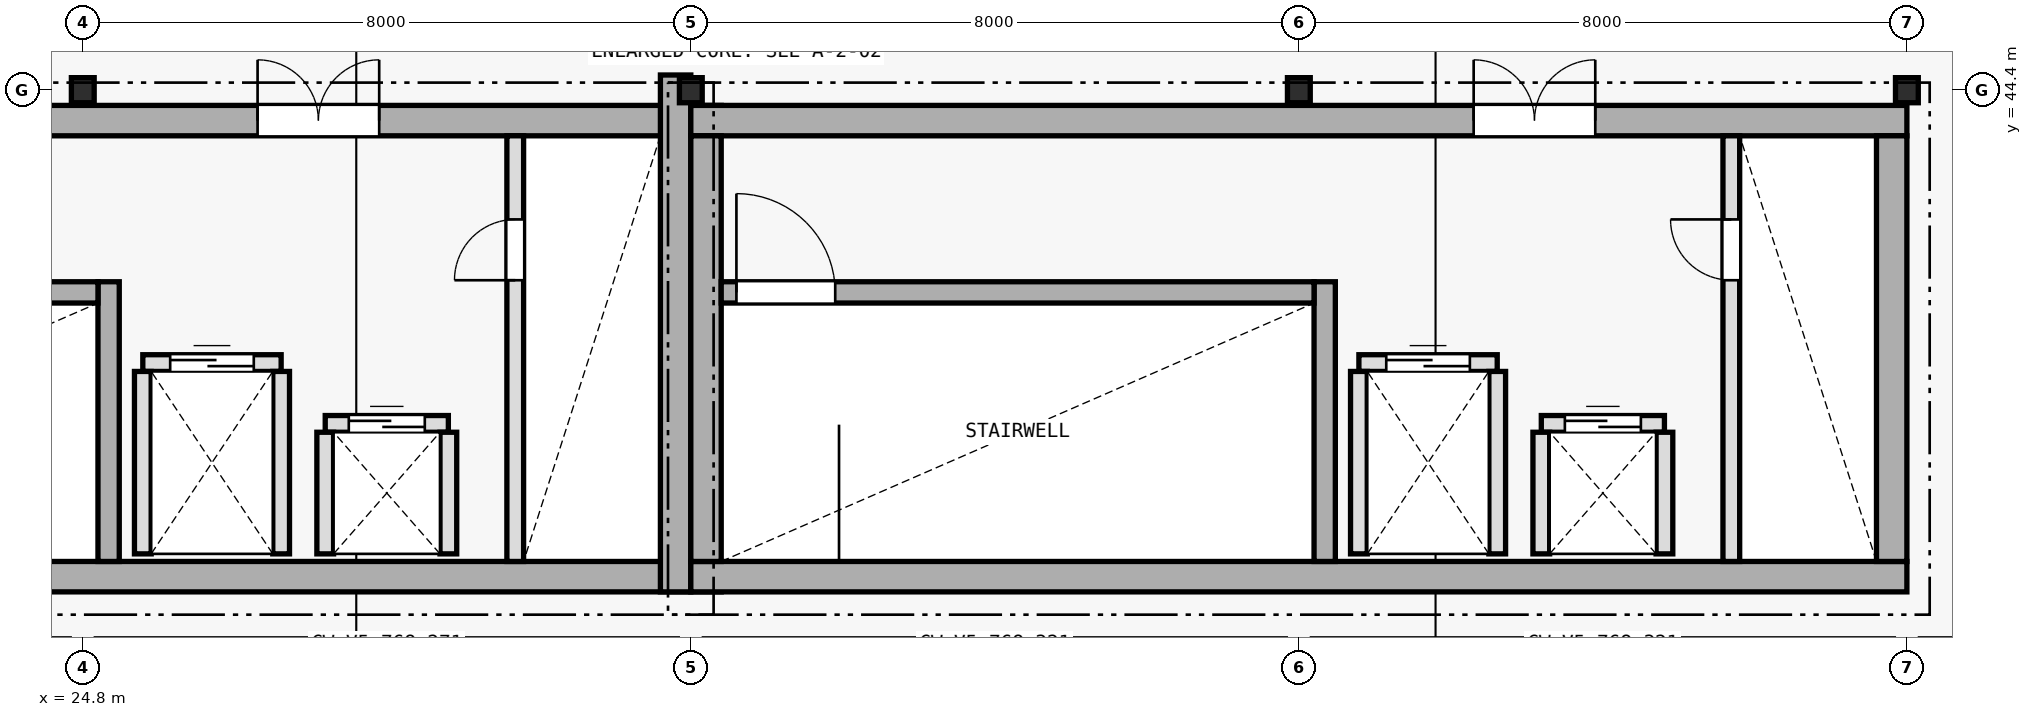
"""IFC4 building model, lengths in metres.
Left out: names, types, materials, properties, quantities, classifications, styles, units other than length and angle.
Written with IfcOpenShell. Run it as: python <this file> out.ifc"""

import sys

from ifc_helpers import new_model, si_unit, direction, frame, frame_2d, origin, origin_2d, place, context, subcontext, project, spatial, rectangle, i_section, extrude, element, fill, save


model = new_model("IFC4")
c1 = context("Model", 3, precision=1e-05, world=origin(), true_north=direction((0.0, 1.0)))
c2 = subcontext(c1, "Body", "Model", "MODEL_VIEW")
j1 = project(units=[si_unit("LENGTHUNIT", "METRE"), si_unit("PLANEANGLEUNIT", "RADIAN")], contexts=[c1])
p1 = place(None, origin())
s1 = spatial("IfcSite", under=j1, at=p1, CompositionType="ELEMENT")
p2 = place(p1, origin())
s2 = spatial("IfcBuilding", under=s1, at=p2, CompositionType="ELEMENT")
p3 = place(p2, frame((0.0, 0.0, 31.1)))
s3 = spatial("IfcBuildingStorey", under=s2, at=p3, CompositionType="ELEMENT", Elevation=31.1)
p4 = place(p3, frame((16.8, 38.0, 0.0), z_axis=(0.0, 0.0, 1.0), x_axis=(1.0, 0.0, 0.0)))
e1 = element("IfcWall", 1, at=p4, inside=s3, PredefinedType="SHEAR", context=c2, shape_type="SweptSolid", body=[
    extrude(rectangle(XDim=16.4, YDim=0.4, at=frame_2d((8.2, 0.0))), origin(), (0.0, 0.0, 1.0), 3.895),
])
p5 = place(p3, frame((16.8, 44.0, 0.0), z_axis=(0.0, 0.0, 1.0), x_axis=(1.0, 0.0, 0.0)))
e2 = element("IfcWall", 2, at=p5, inside=s3, PredefinedType="SHEAR", context=c2, shape_type="SweptSolid", body=[
    extrude(rectangle(XDim=16.4, YDim=0.4, at=frame_2d((8.2, 0.0))), origin(), (0.0, 0.0, 1.0), 3.895),
])
p6 = place(p5, frame((10.3, 0.0, 0.0)))
e3 = element("IfcOpeningElement", 3, at=p6, cuts=e2, PredefinedType="OPENING", context=c2, shape_type="SweptSolid", body=[
    extrude(rectangle(XDim=1.6, YDim=2.2, at=frame_2d((0.8, 1.1))), frame((0.0, 0.21, 0.0), z_axis=(0.0, -1.0, 0.0), x_axis=(1.0, 0.0, 0.0)), (0.0, 0.0, 1.0), 0.42),
])
p7 = place(p3, frame((32.6, 37.8, 0.0), z_axis=(0.0, 0.0, 1.0), x_axis=(0.0, 1.0, 0.0)))
e4 = element("IfcWall", 4, at=p7, inside=s3, PredefinedType="SHEAR", context=c2, shape_type="SweptSolid", body=[
    extrude(rectangle(XDim=6.8, YDim=0.4, at=frame_2d((3.4, 0.0))), origin(), (0.0, 0.0, 1.0), 3.895),
])
p8 = place(p3, frame((25.14, 38.2, 0.0), z_axis=(0.0, 0.0, 1.0), x_axis=(0.0, 1.0, 0.0)))
e5 = element("IfcWall", 5, at=p8, inside=s3, PredefinedType="SHEAR", context=c2, shape_type="SweptSolid", body=[
    extrude(rectangle(XDim=3.68, YDim=0.28, at=frame_2d((1.84, 0.0))), origin(), (0.0, 0.0, 1.0), 3.895),
])
p9 = place(p3, frame((17.2, 41.74, 0.0), z_axis=(0.0, 0.0, 1.0), x_axis=(1.0, 0.0, 0.0)))
e6 = element("IfcWall", 6, at=p9, inside=s3, PredefinedType="SHEAR", context=c2, shape_type="SweptSolid", body=[
    extrude(rectangle(XDim=7.8, YDim=0.28, at=frame_2d((3.9, 0.0))), origin(), (0.0, 0.0, 1.0), 3.895),
])
p10 = place(p9, frame((0.2, 0.0, 0.0)))
e7 = element("IfcOpeningElement", 7, at=p10, cuts=e6, PredefinedType="OPENING", context=c2, shape_type="SweptSolid", body=[
    extrude(rectangle(XDim=1.3, YDim=2.2, at=frame_2d((0.65, 1.1))), frame((0.0, 0.15, 0.0), z_axis=(0.0, -1.0, 0.0), x_axis=(1.0, 0.0, 0.0)), (0.0, 0.0, 1.0), 0.3),
])
p11 = place(p3, frame((32.8, 38.0, 0.0), z_axis=(0.0, 0.0, 1.0), x_axis=(1.0, 0.0, 0.0)))
e8 = element("IfcWall", 8, at=p11, inside=s3, PredefinedType="SHEAR", context=c2, shape_type="SweptSolid", body=[
    extrude(rectangle(XDim=16.0, YDim=0.4, at=frame_2d((8.0, 0.0))), origin(), (0.0, 0.0, 1.0), 3.895),
])
p12 = place(p3, frame((32.8, 44.0, 0.0), z_axis=(0.0, 0.0, 1.0), x_axis=(1.0, 0.0, 0.0)))
e9 = element("IfcWall", 9, at=p12, inside=s3, PredefinedType="SHEAR", context=c2, shape_type="SweptSolid", body=[
    extrude(rectangle(XDim=16.0, YDim=0.4, at=frame_2d((8.0, 0.0))), origin(), (0.0, 0.0, 1.0), 3.895),
])
p13 = place(p12, frame((10.3, 0.0, 0.0)))
e10 = element("IfcOpeningElement", 10, at=p13, cuts=e9, PredefinedType="OPENING", context=c2, shape_type="SweptSolid", body=[
    extrude(rectangle(XDim=1.6, YDim=2.2, at=frame_2d((0.8, 1.1))), frame((0.0, 0.21, 0.0), z_axis=(0.0, -1.0, 0.0), x_axis=(1.0, 0.0, 0.0)), (0.0, 0.0, 1.0), 0.42),
])
for number, where, z_axis, x_axis in (
    (11, (33.0, 38.2, 0.0), (0.0, 0.0, 1.0), (0.0, 1.0, 0.0)),
    (12, (48.6, 38.2, 0.0), (0.0, 0.0, 1.0), (0.0, 1.0, 0.0)),
):
    element("IfcWall", number, at=place(p3, frame(where, z_axis=z_axis, x_axis=x_axis)), inside=s3, PredefinedType="SHEAR", context=c2, shape_type="SweptSolid", body=[
        extrude(rectangle(XDim=5.6, YDim=0.4, at=frame_2d((2.8, 0.0))), origin(), (0.0, 0.0, 1.0), 3.895),
    ])
p14 = place(p3, frame((41.14, 38.2, 0.0), z_axis=(0.0, 0.0, 1.0), x_axis=(0.0, 1.0, 0.0)))
e13 = element("IfcWall", 13, at=p14, inside=s3, PredefinedType="SHEAR", context=c2, shape_type="SweptSolid", body=[
    extrude(rectangle(XDim=3.68, YDim=0.28, at=frame_2d((1.84, 0.0))), origin(), (0.0, 0.0, 1.0), 3.895),
])
p15 = place(p3, frame((33.2, 41.74, 0.0), z_axis=(0.0, 0.0, 1.0), x_axis=(1.0, 0.0, 0.0)))
e14 = element("IfcWall", 14, at=p15, inside=s3, PredefinedType="SHEAR", context=c2, shape_type="SweptSolid", body=[
    extrude(rectangle(XDim=7.8, YDim=0.28, at=frame_2d((3.9, 0.0))), origin(), (0.0, 0.0, 1.0), 3.895),
])
p16 = place(p15, frame((0.2, 0.0, 0.0)))
e15 = element("IfcOpeningElement", 15, at=p16, cuts=e14, PredefinedType="OPENING", context=c2, shape_type="SweptSolid", body=[
    extrude(rectangle(XDim=1.3, YDim=2.2, at=frame_2d((0.65, 1.1))), frame((0.0, 0.15, 0.0), z_axis=(0.0, -1.0, 0.0), x_axis=(1.0, 0.0, 0.0)), (0.0, 0.0, 1.0), 0.3),
])
for number, where, z_axis, x_axis in (
    (16, (24.8, 44.4, 0.0), (0.0, 0.0, 1.0), (1.0, 0.0, 0.0)),
    (17, (32.8, 44.4, 0.0), (0.0, 0.0, 1.0), (1.0, 0.0, 0.0)),
    (18, (40.8, 44.4, 0.0), (0.0, 0.0, 1.0), (1.0, 0.0, 0.0)),
    (19, (48.8, 44.4, 0.0), (0.0, 0.0, 1.0), (1.0, 0.0, 0.0)),
):
    element("IfcColumn", number, at=place(p3, frame(where, z_axis=z_axis, x_axis=x_axis)), inside=s3, PredefinedType="COLUMN", context=c2, shape_type="SweptSolid", body=[
        extrude(i_section(OverallWidth=0.3, OverallDepth=0.33, WebThickness=0.01, FlangeThickness=0.017, FilletRadius=0.027, at=origin_2d()), origin(), (0.0, 0.0, 1.0), 3.9),
    ])
p17 = place(p3, frame((25.59, 40.81, 0.0), z_axis=(0.0, 0.0, 1.0), x_axis=(1.0, 0.0, 0.0)))
e20 = element("IfcWall", 20, at=p17, inside=s3, PredefinedType="PLUMBINGWALL", context=c2, shape_type="SweptSolid", body=[
    extrude(rectangle(XDim=1.82, YDim=0.22, at=frame_2d((0.91, 0.0))), origin(), (0.0, 0.0, 1.0), 3.62),
])
p18 = place(p17, frame((0.36, 0.0, 0.0)))
e21 = element("IfcOpeningElement", 21, at=p18, cuts=e20, PredefinedType="OPENING", context=c2, shape_type="SweptSolid", body=[
    extrude(rectangle(XDim=1.1, YDim=2.2, at=frame_2d((0.55, 1.1))), frame((0.0, 0.12, 0.0), z_axis=(0.0, -1.0, 0.0), x_axis=(1.0, 0.0, 0.0)), (0.0, 0.0, 1.0), 0.24),
])
for number, where, z_axis, x_axis in (
    (22, (25.59, 38.3, 0.0), (0.0, 0.0, 1.0), (0.0, 1.0, 0.0)),
    (23, (27.41, 38.3, 0.0), (0.0, 0.0, 1.0), (0.0, 1.0, 0.0)),
):
    element("IfcWall", number, at=place(p3, frame(where, z_axis=z_axis, x_axis=x_axis)), inside=s3, PredefinedType="PLUMBINGWALL", context=c2, shape_type="SweptSolid", body=[
        extrude(rectangle(XDim=2.4, YDim=0.22, at=frame_2d((1.2, 0.0))), origin(), (0.0, 0.0, 1.0), 3.62),
    ])
p19 = place(p3, frame((27.99, 40.01, 0.0), z_axis=(0.0, 0.0, 1.0), x_axis=(1.0, 0.0, 0.0)))
e24 = element("IfcWall", 24, at=p19, inside=s3, PredefinedType="PLUMBINGWALL", context=c2, shape_type="SweptSolid", body=[
    extrude(rectangle(XDim=1.62, YDim=0.22, at=frame_2d((0.81, 0.0))), origin(), (0.0, 0.0, 1.0), 3.62),
])
p20 = place(p19, frame((0.31, 0.0, 0.0)))
e25 = element("IfcOpeningElement", 25, at=p20, cuts=e24, PredefinedType="OPENING", context=c2, shape_type="SweptSolid", body=[
    extrude(rectangle(XDim=1.0, YDim=2.2, at=frame_2d((0.5, 1.1))), frame((0.0, 0.12, 0.0), z_axis=(0.0, -1.0, 0.0), x_axis=(1.0, 0.0, 0.0)), (0.0, 0.0, 1.0), 0.24),
])
for number, where, z_axis, x_axis in (
    (26, (27.99, 38.3, 0.0), (0.0, 0.0, 1.0), (0.0, 1.0, 0.0)),
    (27, (29.61, 38.3, 0.0), (0.0, 0.0, 1.0), (0.0, 1.0, 0.0)),
):
    element("IfcWall", number, at=place(p3, frame(where, z_axis=z_axis, x_axis=x_axis)), inside=s3, PredefinedType="PLUMBINGWALL", context=c2, shape_type="SweptSolid", body=[
        extrude(rectangle(XDim=1.6, YDim=0.22, at=frame_2d((0.8, 0.0))), origin(), (0.0, 0.0, 1.0), 3.62),
    ])
p21 = place(p3, frame((30.49, 38.2, 0.0), z_axis=(0.0, 0.0, 1.0), x_axis=(0.0, 1.0, 0.0)))
e28 = element("IfcWall", 28, at=p21, inside=s3, PredefinedType="PLUMBINGWALL", context=c2, shape_type="SweptSolid", body=[
    extrude(rectangle(XDim=5.6, YDim=0.22, at=frame_2d((2.8, 0.0))), origin(), (0.0, 0.0, 1.0), 3.62),
])
p22 = place(p21, frame((3.7, 0.0, 0.0)))
e29 = element("IfcOpeningElement", 29, at=p22, cuts=e28, PredefinedType="OPENING", context=c2, shape_type="SweptSolid", body=[
    extrude(rectangle(XDim=0.8, YDim=2.1, at=frame_2d((0.4, 1.05))), frame((0.0, 0.12, 0.0), z_axis=(0.0, -1.0, 0.0), x_axis=(1.0, 0.0, 0.0)), (0.0, 0.0, 1.0), 0.24),
])
p23 = place(p3, frame((41.59, 40.81, 0.0), z_axis=(0.0, 0.0, 1.0), x_axis=(1.0, 0.0, 0.0)))
e30 = element("IfcWall", 30, at=p23, inside=s3, PredefinedType="PLUMBINGWALL", context=c2, shape_type="SweptSolid", body=[
    extrude(rectangle(XDim=1.82, YDim=0.22, at=frame_2d((0.91, 0.0))), origin(), (0.0, 0.0, 1.0), 3.62),
])
p24 = place(p23, frame((0.36, 0.0, 0.0)))
e31 = element("IfcOpeningElement", 31, at=p24, cuts=e30, PredefinedType="OPENING", context=c2, shape_type="SweptSolid", body=[
    extrude(rectangle(XDim=1.1, YDim=2.2, at=frame_2d((0.55, 1.1))), frame((0.0, 0.12, 0.0), z_axis=(0.0, -1.0, 0.0), x_axis=(1.0, 0.0, 0.0)), (0.0, 0.0, 1.0), 0.24),
])
for number, where, z_axis, x_axis in (
    (32, (41.59, 38.3, 0.0), (0.0, 0.0, 1.0), (0.0, 1.0, 0.0)),
    (33, (43.41, 38.3, 0.0), (0.0, 0.0, 1.0), (0.0, 1.0, 0.0)),
):
    element("IfcWall", number, at=place(p3, frame(where, z_axis=z_axis, x_axis=x_axis)), inside=s3, PredefinedType="PLUMBINGWALL", context=c2, shape_type="SweptSolid", body=[
        extrude(rectangle(XDim=2.4, YDim=0.22, at=frame_2d((1.2, 0.0))), origin(), (0.0, 0.0, 1.0), 3.62),
    ])
p25 = place(p3, frame((43.99, 40.01, 0.0), z_axis=(0.0, 0.0, 1.0), x_axis=(1.0, 0.0, 0.0)))
e34 = element("IfcWall", 34, at=p25, inside=s3, PredefinedType="PLUMBINGWALL", context=c2, shape_type="SweptSolid", body=[
    extrude(rectangle(XDim=1.62, YDim=0.22, at=frame_2d((0.81, 0.0))), origin(), (0.0, 0.0, 1.0), 3.62),
])
p26 = place(p25, frame((0.31, 0.0, 0.0)))
e35 = element("IfcOpeningElement", 35, at=p26, cuts=e34, PredefinedType="OPENING", context=c2, shape_type="SweptSolid", body=[
    extrude(rectangle(XDim=1.0, YDim=2.2, at=frame_2d((0.5, 1.1))), frame((0.0, 0.12, 0.0), z_axis=(0.0, -1.0, 0.0), x_axis=(1.0, 0.0, 0.0)), (0.0, 0.0, 1.0), 0.24),
])
for number, where, z_axis, x_axis in (
    (36, (43.99, 38.3, 0.0), (0.0, 0.0, 1.0), (0.0, 1.0, 0.0)),
    (37, (45.61, 38.3, 0.0), (0.0, 0.0, 1.0), (0.0, 1.0, 0.0)),
):
    element("IfcWall", number, at=place(p3, frame(where, z_axis=z_axis, x_axis=x_axis)), inside=s3, PredefinedType="PLUMBINGWALL", context=c2, shape_type="SweptSolid", body=[
        extrude(rectangle(XDim=1.6, YDim=0.22, at=frame_2d((0.8, 0.0))), origin(), (0.0, 0.0, 1.0), 3.62),
    ])
p27 = place(p3, frame((46.49, 38.2, 0.0), z_axis=(0.0, 0.0, 1.0), x_axis=(0.0, 1.0, 0.0)))
e38 = element("IfcWall", 38, at=p27, inside=s3, PredefinedType="PLUMBINGWALL", context=c2, shape_type="SweptSolid", body=[
    extrude(rectangle(XDim=5.6, YDim=0.22, at=frame_2d((2.8, 0.0))), origin(), (0.0, 0.0, 1.0), 3.62),
])
p28 = place(p27, frame((3.7, 0.0, 0.0)))
e39 = element("IfcOpeningElement", 39, at=p28, cuts=e38, PredefinedType="OPENING", context=c2, shape_type="SweptSolid", body=[
    extrude(rectangle(XDim=0.8, YDim=2.1, at=frame_2d((0.4, 1.05))), frame((0.0, 0.12, 0.0), z_axis=(0.0, -1.0, 0.0), x_axis=(1.0, 0.0, 0.0)), (0.0, 0.0, 1.0), 0.24),
])
p29 = place(p2, frame((0.0, 0.0, 35.0)))
p30 = place(p29, frame((0.0, 0.0, -0.28)))
p31 = place(p30, frame((37.0, 40.0, 0.23)))
e40 = element("IfcWindow", 40, at=p31, inside=s3, PartitioningType="SINGLE_PANEL", PredefinedType="SKYLIGHT", context=c2, shape_type="SweptSolid", body=[
    extrude(rectangle(XDim=1.1, YDim=1.4, at=origin_2d()), origin(), (0.0, 0.0, 1.0), 0.05),
])
p32 = place(p18, origin())
e41 = element("IfcDoor", 41, at=p32, inside=s3, OperationType="DOUBLE_DOOR_SLIDING", PredefinedType="DOOR", context=c2, shape_type="SweptSolid", body=[
    extrude(rectangle(XDim=1.1, YDim=2.2, at=frame_2d((0.55, 1.1))), frame((0.0, 0.025, 0.0), z_axis=(0.0, -1.0, 0.0), x_axis=(1.0, 0.0, 0.0)), (0.0, 0.0, 1.0), 0.05),
])
fill(e21, e41)
p33 = place(p20, origin())
e42 = element("IfcDoor", 42, at=p33, inside=s3, OperationType="DOUBLE_DOOR_SLIDING", PredefinedType="DOOR", context=c2, shape_type="SweptSolid", body=[
    extrude(rectangle(XDim=1.0, YDim=2.2, at=frame_2d((0.5, 1.1))), frame((0.0, 0.025, 0.0), z_axis=(0.0, -1.0, 0.0), x_axis=(1.0, 0.0, 0.0)), (0.0, 0.0, 1.0), 0.05),
])
fill(e25, e42)
p34 = place(p22, origin())
e43 = element("IfcDoor", 43, at=p34, inside=s3, OperationType="SINGLE_SWING_LEFT", PredefinedType="DOOR", context=c2, shape_type="SweptSolid", body=[
    extrude(rectangle(XDim=0.8, YDim=2.1, at=frame_2d((0.4, 1.05))), frame((0.0, 0.025, 0.0), z_axis=(0.0, -1.0, 0.0), x_axis=(1.0, 0.0, 0.0)), (0.0, 0.0, 1.0), 0.05),
])
fill(e29, e43)
p35 = place(p6, origin())
e44 = element("IfcDoor", 44, at=p35, inside=s3, OperationType="DOUBLE_DOOR_SINGLE_SWING", PredefinedType="DOOR", context=c2, shape_type="SweptSolid", body=[
    extrude(rectangle(XDim=1.6, YDim=2.2, at=frame_2d((0.8, 1.1))), frame((0.0, 0.025, 0.0), z_axis=(0.0, -1.0, 0.0), x_axis=(1.0, 0.0, 0.0)), (0.0, 0.0, 1.0), 0.05),
])
fill(e3, e44)
p36 = place(p16, origin())
e45 = element("IfcDoor", 45, at=p36, inside=s3, OperationType="SINGLE_SWING_LEFT", PredefinedType="DOOR", context=c2, shape_type="SweptSolid", body=[
    extrude(rectangle(XDim=1.3, YDim=2.2, at=frame_2d((0.65, 1.1))), frame((0.0, 0.025, 0.0), z_axis=(0.0, -1.0, 0.0), x_axis=(1.0, 0.0, 0.0)), (0.0, 0.0, 1.0), 0.05),
])
fill(e15, e45)
p37 = place(p24, origin())
e46 = element("IfcDoor", 46, at=p37, inside=s3, OperationType="DOUBLE_DOOR_SLIDING", PredefinedType="DOOR", context=c2, shape_type="SweptSolid", body=[
    extrude(rectangle(XDim=1.1, YDim=2.2, at=frame_2d((0.55, 1.1))), frame((0.0, 0.025, 0.0), z_axis=(0.0, -1.0, 0.0), x_axis=(1.0, 0.0, 0.0)), (0.0, 0.0, 1.0), 0.05),
])
fill(e31, e46)
p38 = place(p26, origin())
e47 = element("IfcDoor", 47, at=p38, inside=s3, OperationType="DOUBLE_DOOR_SLIDING", PredefinedType="DOOR", context=c2, shape_type="SweptSolid", body=[
    extrude(rectangle(XDim=1.0, YDim=2.2, at=frame_2d((0.5, 1.1))), frame((0.0, 0.025, 0.0), z_axis=(0.0, -1.0, 0.0), x_axis=(1.0, 0.0, 0.0)), (0.0, 0.0, 1.0), 0.05),
])
fill(e35, e47)
p39 = place(p28, origin())
e48 = element("IfcDoor", 48, at=p39, inside=s3, OperationType="SINGLE_SWING_RIGHT", PredefinedType="DOOR", context=c2, shape_type="SweptSolid", body=[
    extrude(rectangle(XDim=0.8, YDim=2.1, at=frame_2d((0.4, 1.05))), frame((0.0, 0.025, 0.0), z_axis=(0.0, -1.0, 0.0), x_axis=(1.0, 0.0, 0.0)), (0.0, 0.0, 1.0), 0.05),
])
fill(e39, e48)
p40 = place(p13, origin())
e49 = element("IfcDoor", 49, at=p40, inside=s3, OperationType="DOUBLE_DOOR_SINGLE_SWING", PredefinedType="DOOR", context=c2, shape_type="SweptSolid", body=[
    extrude(rectangle(XDim=1.6, YDim=2.2, at=frame_2d((0.8, 1.1))), frame((0.0, 0.025, 0.0), z_axis=(0.0, -1.0, 0.0), x_axis=(1.0, 0.0, 0.0)), (0.0, 0.0, 1.0), 0.05),
])
fill(e10, e49)
save(model, sys.argv[1])
